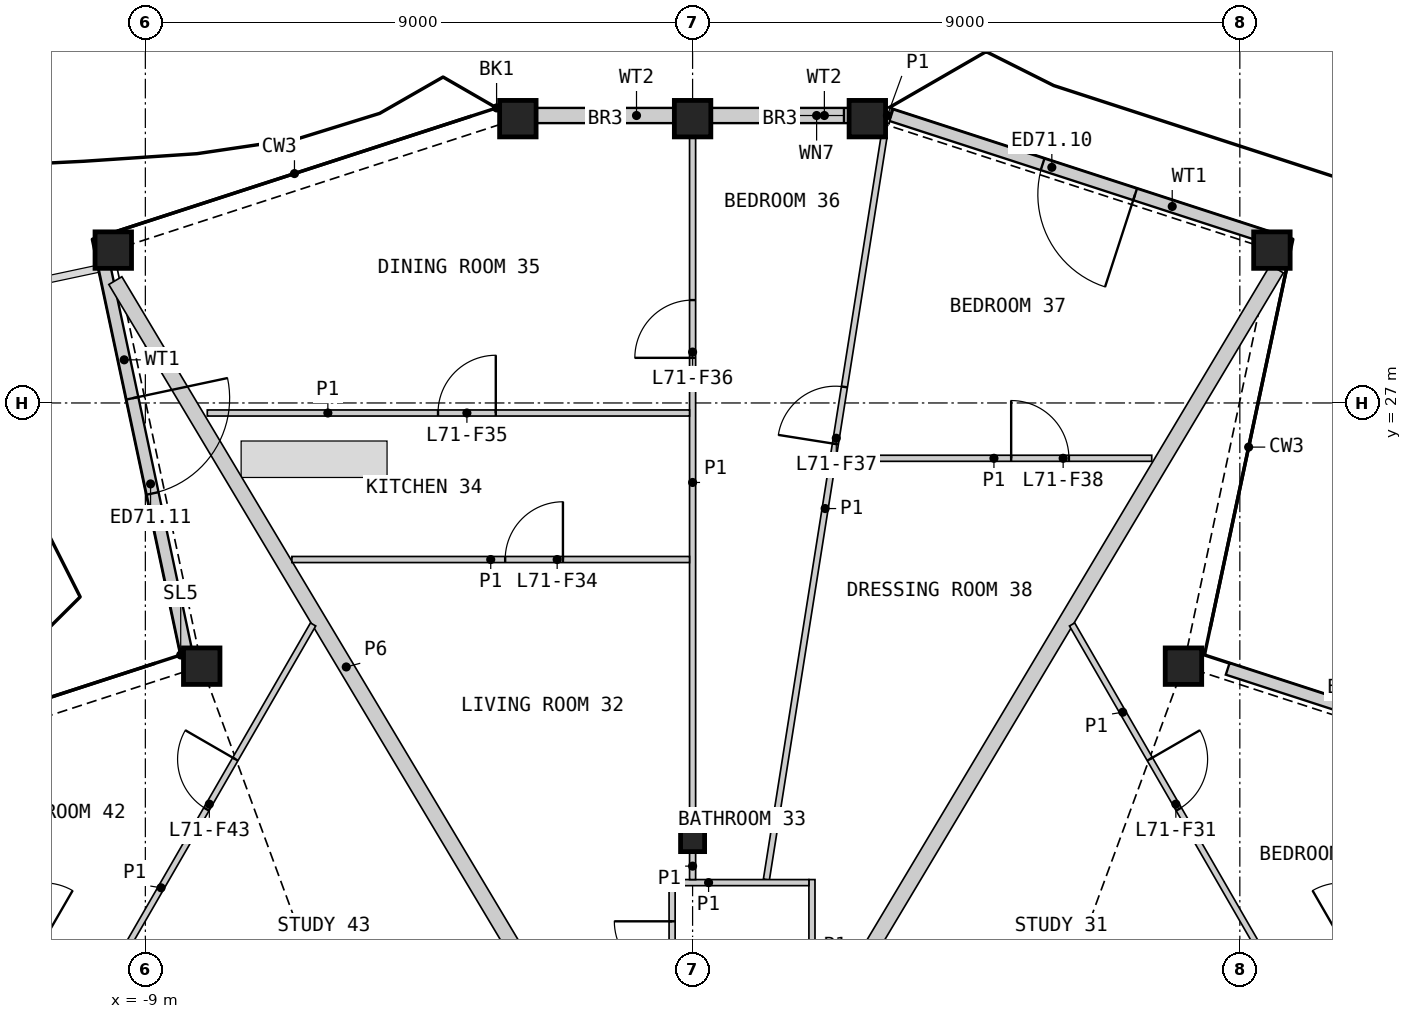
"""IFC4 building model, lengths in metres.
Left out: names, types, materials, properties, quantities, classifications, styles, units other than length and angle.
Written with IfcOpenShell. Run it as: python <this file> out.ifc"""

import sys

from ifc_helpers import new_model, si_unit, direction, frame, frame_2d, origin, origin_2d, place, context, subcontext, project, spatial, rectangle, hollow_rectangle, i_section, extrude, element, fill, save


model = new_model("IFC4")
c1 = context("Model", 3, precision=1e-05, world=origin(), true_north=direction((0.0, 1.0)))
c2 = subcontext(c1, "Body", "Model", "MODEL_VIEW")
j1 = project(units=[si_unit("LENGTHUNIT", "METRE"), si_unit("PLANEANGLEUNIT", "RADIAN")], contexts=[c1])
p1 = place(None, origin())
s1 = spatial("IfcSite", under=j1, at=p1, CompositionType="ELEMENT")
p2 = place(p1, origin())
s2 = spatial("IfcBuilding", under=s1, at=p2, CompositionType="ELEMENT")
p3 = place(p2, frame((0.0, 0.0, 322.2)))
s3 = spatial("IfcBuildingStorey", under=s2, at=p3, CompositionType="ELEMENT", Elevation=322.2)
for number, where, z_axis, x_axis in (
    (1, (8.073, 22.671, 0.0), (0.0, 0.0, 1.0), (1.0, 0.0, 0.0)),
    (2, (9.527, 29.514, 0.0), (0.0, 0.0, 1.0), (1.0, 0.0, 0.0)),
    (3, (2.874, 31.676, 0.0), (0.0, 0.0, 1.0), (1.0, 0.0, 0.0)),
    (4, (0.0, 31.676, 0.0), (0.0, 0.0, 1.0), (1.0, 0.0, 0.0)),
    (5, (-2.874, 31.676, 0.0), (0.0, 0.0, 1.0), (1.0, 0.0, 0.0)),
    (6, (-9.527, 29.514, 0.0), (0.0, 0.0, 1.0), (1.0, 0.0, 0.0)),
    (7, (-8.073, 22.671, 0.0), (0.0, 0.0, 1.0), (1.0, 0.0, 0.0)),
):
    element("IfcColumn", number, at=place(p3, frame(where, z_axis=z_axis, x_axis=x_axis)), inside=s3, PredefinedType="COLUMN", context=c2, shape_type="SweptSolid", body=[
        extrude(hollow_rectangle(XDim=0.6, YDim=0.6, WallThickness=0.04, at=origin_2d()), origin(), (0.0, 0.0, 1.0), 3.4),
    ])
p4 = place(p3, frame((0.0, 19.811, 0.0), z_axis=(0.0, 0.0, 1.0), x_axis=(1.0, 0.0, 0.0)))
e8 = element("IfcColumn", 8, at=p4, inside=s3, PredefinedType="COLUMN", context=c2, shape_type="SweptSolid", body=[
    extrude(i_section(OverallWidth=0.396, OverallDepth=0.381, WebThickness=0.019, FlangeThickness=0.03, at=origin_2d()), origin(), (0.0, 0.0, 1.0), 3.4),
])
p5 = place(p3, frame((14.623, 20.734, 0.0), z_axis=(0.0, 0.0, 1.0), x_axis=(-0.951056631566, 0.309016639608, 0.0)))
e9 = element("IfcWall", 9, at=p5, inside=s3, PredefinedType="SOLIDWALL", context=c2, shape_type="SweptSolid", body=[
    extrude(rectangle(XDim=6.122, YDim=0.2, at=frame_2d((3.061, 0.0))), origin(), (0.0, 0.0, 1.0), 2.488),
])
p6 = place(p5, frame((2.261, 0.0, 0.0)))
e10 = element("IfcOpeningElement", 10, at=p6, cuts=e9, PredefinedType="OPENING", context=c2, shape_type="SweptSolid", body=[
    extrude(rectangle(XDim=1.6, YDim=2.25, at=frame_2d((0.8, 1.125))), frame((0.0, 0.11, 0.0), z_axis=(0.0, -1.0, 0.0), x_axis=(1.0, 0.0, 0.0)), (0.0, 0.0, 1.0), 0.22),
])
p7 = place(p3, frame((9.428, 29.732, 0.0), z_axis=(0.0, 0.0, 1.0), x_axis=(-0.951057057516, 0.309015328664, 0.0)))
e11 = element("IfcWall", 11, at=p7, inside=s3, PredefinedType="SOLIDWALL", context=c2, shape_type="SweptSolid", body=[
    extrude(rectangle(XDim=6.477, YDim=0.2, at=frame_2d((3.238, 0.0))), origin(), (0.0, 0.0, 1.0), 2.488),
])
p8 = place(p7, frame((2.261, 0.0, 0.0)))
e12 = element("IfcOpeningElement", 12, at=p8, cuts=e11, PredefinedType="OPENING", context=c2, shape_type="SweptSolid", body=[
    extrude(rectangle(XDim=1.6, YDim=2.25, at=frame_2d((0.8, 1.125))), frame((0.0, 0.11, 0.0), z_axis=(0.0, -1.0, 0.0), x_axis=(1.0, 0.0, 0.0)), (0.0, 0.0, 1.0), 0.22),
])
p9 = place(p3, frame((2.79, 31.728, 0.0), z_axis=(0.0, 0.0, 1.0), x_axis=(-1.0, 0.0, 0.0)))
e13 = element("IfcWall", 13, at=p9, inside=s3, PredefinedType="SOLIDWALL", context=c2, shape_type="SweptSolid", body=[
    extrude(rectangle(XDim=2.49, YDim=0.25, at=frame_2d((1.245, 0.0))), origin(), (0.0, 0.0, 1.0), 2.488),
])
p10 = place(p9, frame((0.3, 0.0, 0.4)))
e14 = element("IfcOpeningElement", 14, at=p10, cuts=e13, PredefinedType="OPENING", context=c2, shape_type="SweptSolid", body=[
    extrude(rectangle(XDim=0.9, YDim=0.6, at=frame_2d((0.45, 0.3))), frame((0.0, 0.135, 0.0), z_axis=(0.0, -1.0, 0.0), x_axis=(1.0, 0.0, 0.0)), (0.0, 0.0, 1.0), 0.27),
])
p11 = place(p3, frame((-0.3, 31.728, 0.0), z_axis=(0.0, 0.0, 1.0), x_axis=(-1.0, 0.0, 0.0)))
e15 = element("IfcWall", 15, at=p11, inside=s3, PredefinedType="SOLIDWALL", context=c2, shape_type="SweptSolid", body=[
    extrude(rectangle(XDim=2.49, YDim=0.25, at=frame_2d((1.245, 0.0))), origin(), (0.0, 0.0, 1.0), 2.488),
])
p12 = place(p3, frame((-9.684, 29.289, 0.0), z_axis=(0.0, 0.0, 1.0), x_axis=(0.207920686021, -0.978145688701, 0.0)))
e16 = element("IfcWall", 16, at=p12, inside=s3, PredefinedType="SOLIDWALL", context=c2, shape_type="SweptSolid", body=[
    extrude(rectangle(XDim=6.459, YDim=0.2, at=frame_2d((3.229, 0.0))), origin(), (0.0, 0.0, 1.0), 2.488),
])
p13 = place(p12, frame((2.261, 0.0, 0.0)))
e17 = element("IfcOpeningElement", 17, at=p13, cuts=e16, PredefinedType="OPENING", context=c2, shape_type="SweptSolid", body=[
    extrude(rectangle(XDim=1.6, YDim=2.25, at=frame_2d((0.8, 1.125))), frame((0.0, 0.11, 0.0), z_axis=(0.0, -1.0, 0.0), x_axis=(1.0, 0.0, 0.0)), (0.0, 0.0, 1.0), 0.22),
])
p14 = place(p3, frame((1.899, 16.304, 0.0), z_axis=(0.0, 0.0, 1.0), x_axis=(0.512977925681, 0.858401798556, 0.0)))
e18 = element("IfcWall", 18, at=p14, inside=s3, PredefinedType="PARTITIONING", context=c2, shape_type="SweptSolid", body=[
    extrude(rectangle(XDim=15.028, YDim=0.25, at=frame_2d((7.514, 0.0))), origin(), (0.0, 0.0, 1.0), 2.33),
])
p15 = place(p3, frame((-9.493, 29.012, 0.0), z_axis=(0.0, 0.0, 1.0), x_axis=(0.512967150926, -0.85840823742, 0.0)))
e19 = element("IfcWall", 19, at=p15, inside=s3, PredefinedType="PARTITIONING", context=c2, shape_type="SweptSolid", body=[
    extrude(rectangle(XDim=14.805, YDim=0.25, at=frame_2d((7.402, 0.0))), origin(), (0.0, 0.0, 1.0), 2.33),
])
p16 = place(p3, frame((-14.417, 20.32, 0.0), z_axis=(0.0, 0.0, 1.0), x_axis=(0.866021216079, -0.500007253249, 0.0)))
e20 = element("IfcWall", 20, at=p16, inside=s3, PredefinedType="PARTITIONING", context=c2, shape_type="SweptSolid", body=[
    extrude(rectangle(XDim=12.639, YDim=0.1, at=frame_2d((6.32, 0.0))), origin(), (0.0, 0.0, 1.0), 2.33),
])
p17 = place(p16, frame((3.375, 0.0, 0.0)))
e21 = element("IfcOpeningElement", 21, at=p17, cuts=e20, PredefinedType="OPENING", context=c2, shape_type="SweptSolid", body=[
    extrude(rectangle(XDim=0.95, YDim=2.1, at=frame_2d((0.475, 1.05))), frame((0.0, 0.06, 0.0), z_axis=(0.0, -1.0, 0.0), x_axis=(1.0, 0.0, 0.0)), (0.0, 0.0, 1.0), 0.12),
])
p18 = place(p3, frame((3.47, 14.0, 0.0), z_axis=(0.0, 0.0, 1.0), x_axis=(0.866021216079, 0.500007253249, 0.0)))
e22 = element("IfcWall", 22, at=p18, inside=s3, PredefinedType="PARTITIONING", context=c2, shape_type="SweptSolid", body=[
    extrude(rectangle(XDim=12.639, YDim=0.1, at=frame_2d((6.32, 0.0))), origin(), (0.0, 0.0, 1.0), 2.33),
])
p19 = place(p18, frame((8.314, 0.0, 0.0)))
e23 = element("IfcOpeningElement", 23, at=p19, cuts=e22, PredefinedType="OPENING", context=c2, shape_type="SweptSolid", body=[
    extrude(rectangle(XDim=0.95, YDim=2.1, at=frame_2d((0.475, 1.05))), frame((0.0, 0.06, 0.0), z_axis=(0.0, -1.0, 0.0), x_axis=(1.0, 0.0, 0.0)), (0.0, 0.0, 1.0), 0.12),
])
p20 = place(p3, frame((1.213, 19.16, 0.0), z_axis=(0.0, 0.0, 1.0), x_axis=(0.156426176129, 0.987689653394, 0.0)))
e24 = element("IfcWall", 24, at=p20, inside=s3, PredefinedType="PARTITIONING", context=c2, shape_type="SweptSolid", body=[
    extrude(rectangle(XDim=12.358, YDim=0.1, at=frame_2d((6.179, 0.0))), origin(), (0.0, 0.0, 1.0), 2.33),
])
p21 = place(p20, frame((7.255, 0.0, 0.0)))
e25 = element("IfcOpeningElement", 25, at=p21, cuts=e24, PredefinedType="OPENING", context=c2, shape_type="SweptSolid", body=[
    extrude(rectangle(XDim=0.95, YDim=2.1, at=frame_2d((0.475, 1.05))), frame((0.0, 0.06, 0.0), z_axis=(0.0, -1.0, 0.0), x_axis=(1.0, 0.0, 0.0)), (0.0, 0.0, 1.0), 0.12),
])
p22 = place(p3, frame((0.0, 20.019, 0.0), z_axis=(0.0, 0.0, 1.0), x_axis=(0.0, 1.0, 0.0)))
e26 = element("IfcWall", 26, at=p22, inside=s3, PredefinedType="PARTITIONING", context=c2, shape_type="SweptSolid", body=[
    extrude(rectangle(XDim=11.347, YDim=0.1, at=frame_2d((5.674, 0.0))), origin(), (0.0, 0.0, 1.0), 2.33),
])
p23 = place(p22, frame((7.723, 0.0, 0.0)))
e27 = element("IfcOpeningElement", 27, at=p23, cuts=e26, PredefinedType="OPENING", context=c2, shape_type="SweptSolid", body=[
    extrude(rectangle(XDim=0.95, YDim=2.1, at=frame_2d((0.475, 1.05))), frame((0.0, 0.06, 0.0), z_axis=(0.0, -1.0, 0.0), x_axis=(1.0, 0.0, 0.0)), (0.0, 0.0, 1.0), 0.12),
])
p24 = place(p3, frame((-7.981, 26.835, 0.0), z_axis=(0.0, 0.0, 1.0), x_axis=(1.0, 0.0, 0.0)))
e28 = element("IfcWall", 28, at=p24, inside=s3, PredefinedType="PARTITIONING", context=c2, shape_type="SweptSolid", body=[
    extrude(rectangle(XDim=7.931, YDim=0.1, at=frame_2d((3.966, 0.0))), origin(), (0.0, 0.0, 1.0), 2.33),
])
p25 = place(p24, frame((3.794, 0.0, 0.0)))
e29 = element("IfcOpeningElement", 29, at=p25, cuts=e28, PredefinedType="OPENING", context=c2, shape_type="SweptSolid", body=[
    extrude(rectangle(XDim=0.95, YDim=2.1, at=frame_2d((0.475, 1.05))), frame((0.0, 0.06, 0.0), z_axis=(0.0, -1.0, 0.0), x_axis=(1.0, 0.0, 0.0)), (0.0, 0.0, 1.0), 0.12),
])
p26 = place(p3, frame((6.241, 23.357, 0.0), z_axis=(0.0, 0.0, 1.0), x_axis=(0.499998189891, -0.866026448849, 0.0)))
e30 = element("IfcWall", 30, at=p26, inside=s3, PredefinedType="PARTITIONING", context=c2, shape_type="SweptSolid", body=[
    extrude(rectangle(XDim=6.668, YDim=0.1, at=frame_2d((3.334, 0.0))), origin(), (0.0, 0.0, 1.0), 2.33),
])
p27 = place(p26, frame((2.558, 0.0, 0.0)))
e31 = element("IfcOpeningElement", 31, at=p27, cuts=e30, PredefinedType="OPENING", context=c2, shape_type="SweptSolid", body=[
    extrude(rectangle(XDim=0.95, YDim=2.1, at=frame_2d((0.475, 1.05))), frame((0.0, 0.06, 0.0), z_axis=(0.0, -1.0, 0.0), x_axis=(1.0, 0.0, 0.0)), (0.0, 0.0, 1.0), 0.12),
])
p28 = place(p3, frame((-9.575, 17.583, 0.0), z_axis=(0.0, 0.0, 1.0), x_axis=(0.499998189891, 0.866026448849, 0.0)))
e32 = element("IfcWall", 32, at=p28, inside=s3, PredefinedType="PARTITIONING", context=c2, shape_type="SweptSolid", body=[
    extrude(rectangle(XDim=6.668, YDim=0.1, at=frame_2d((3.334, 0.0))), origin(), (0.0, 0.0, 1.0), 2.33),
])
p29 = place(p28, frame((3.16, 0.0, 0.0)))
e33 = element("IfcOpeningElement", 33, at=p29, cuts=e32, PredefinedType="OPENING", context=c2, shape_type="SweptSolid", body=[
    extrude(rectangle(XDim=0.95, YDim=2.1, at=frame_2d((0.475, 1.05))), frame((0.0, 0.06, 0.0), z_axis=(0.0, -1.0, 0.0), x_axis=(1.0, 0.0, 0.0)), (0.0, 0.0, 1.0), 0.12),
])
p30 = place(p3, frame((-6.59, 24.425, 0.0), z_axis=(0.0, 0.0, 1.0), x_axis=(1.0, 0.0, 0.0)))
e34 = element("IfcWall", 34, at=p30, inside=s3, PredefinedType="PARTITIONING", context=c2, shape_type="SweptSolid", body=[
    extrude(rectangle(XDim=6.54, YDim=0.1, at=frame_2d((3.27, 0.0))), origin(), (0.0, 0.0, 1.0), 2.33),
])
p31 = place(p30, frame((3.508, 0.0, 0.0)))
e35 = element("IfcOpeningElement", 35, at=p31, cuts=e34, PredefinedType="OPENING", context=c2, shape_type="SweptSolid", body=[
    extrude(rectangle(XDim=0.95, YDim=2.1, at=frame_2d((0.475, 1.05))), frame((0.0, 0.06, 0.0), z_axis=(0.0, -1.0, 0.0), x_axis=(1.0, 0.0, 0.0)), (0.0, 0.0, 1.0), 0.12),
])
p32 = place(p3, frame((2.361, 26.09, 0.0), z_axis=(0.0, 0.0, 1.0), x_axis=(1.0, 0.0, 0.0)))
e36 = element("IfcWall", 36, at=p32, inside=s3, PredefinedType="PARTITIONING", context=c2, shape_type="SweptSolid", body=[
    extrude(rectangle(XDim=5.19, YDim=0.1, at=frame_2d((2.595, 0.0))), origin(), (0.0, 0.0, 1.0), 2.33),
])
p33 = place(p32, frame((2.878, 0.0, 0.0)))
e37 = element("IfcOpeningElement", 37, at=p33, cuts=e36, PredefinedType="OPENING", context=c2, shape_type="SweptSolid", body=[
    extrude(rectangle(XDim=0.95, YDim=2.1, at=frame_2d((0.475, 1.05))), frame((0.0, 0.06, 0.0), z_axis=(0.0, -1.0, 0.0), x_axis=(1.0, 0.0, 0.0)), (0.0, 0.0, 1.0), 0.12),
])
p34 = place(p3, frame((-0.337, 16.511, 0.0), z_axis=(0.0, 0.0, 1.0), x_axis=(0.0, 1.0, 0.0)))
e38 = element("IfcWall", 38, at=p34, inside=s3, PredefinedType="PARTITIONING", context=c2, shape_type="SweptSolid", body=[
    extrude(rectangle(XDim=2.65, YDim=0.1, at=frame_2d((1.325, 0.0))), origin(), (0.0, 0.0, 1.0), 2.33),
])
p35 = place(p34, frame((1.014, 0.0, 0.0)))
e39 = element("IfcOpeningElement", 39, at=p35, cuts=e38, PredefinedType="OPENING", context=c2, shape_type="SweptSolid", body=[
    extrude(rectangle(XDim=0.95, YDim=2.1, at=frame_2d((0.475, 1.05))), frame((0.0, 0.06, 0.0), z_axis=(0.0, -1.0, 0.0), x_axis=(1.0, 0.0, 0.0)), (0.0, 0.0, 1.0), 0.12),
])
p36 = place(p3, frame((1.963, 16.536, 0.0), z_axis=(0.0, 0.0, 1.0), x_axis=(0.0, 1.0, 0.0)))
e40 = element("IfcWall", 40, at=p36, inside=s3, PredefinedType="PARTITIONING", context=c2, shape_type="SweptSolid", body=[
    extrude(rectangle(XDim=2.625, YDim=0.1, at=frame_2d((1.312, 0.0))), origin(), (0.0, 0.0, 1.0), 2.33),
])
p37 = place(p3, frame((-0.287, 19.111, 0.0), z_axis=(0.0, 0.0, 1.0), x_axis=(1.0, 0.0, 0.0)))
e41 = element("IfcWall", 41, at=p37, inside=s3, PredefinedType="PARTITIONING", context=c2, shape_type="SweptSolid", body=[
    extrude(rectangle(XDim=2.2, YDim=0.1, at=frame_2d((1.1, 0.0))), origin(), (0.0, 0.0, 1.0), 2.33),
])
p38 = place(p3, frame((0.0, 19.161, 0.0), z_axis=(0.0, 0.0, 1.0), x_axis=(0.0, 1.0, 0.0)))
e42 = element("IfcWall", 42, at=p38, inside=s3, PredefinedType="PARTITIONING", context=c2, shape_type="SweptSolid", body=[
    extrude(rectangle(XDim=0.442, YDim=0.1, at=frame_2d((0.221, 0.0))), origin(), (0.0, 0.0, 1.0), 2.33),
])
p39 = place(p3, frame((3.184, 31.601, 0.0), z_axis=(0.0, 0.0, 1.0), x_axis=(0.156307264128, 0.987708478844, 0.0)))
e43 = element("IfcWall", 43, at=p39, inside=s3, PredefinedType="PARTITIONING", context=c2, shape_type="SweptSolid", body=[
    extrude(rectangle(XDim=0.255, YDim=0.1, at=frame_2d((0.127, 0.0))), origin(), (0.0, 0.0, 1.0), 2.33),
])
p40 = place(p8, origin())
e44 = element("IfcDoor", 44, at=p40, inside=s3, OperationType="DOUBLE_DOOR_SINGLE_SWING", PredefinedType="DOOR", context=c2, shape_type="SweptSolid", body=[
    extrude(rectangle(XDim=1.6, YDim=2.25, at=frame_2d((0.8, 1.125))), frame((0.0, 0.025, 0.0), z_axis=(0.0, -1.0, 0.0), x_axis=(1.0, 0.0, 0.0)), (0.0, 0.0, 1.0), 0.05),
])
fill(e12, e44)
p41 = place(p10, origin())
e45 = element("IfcWindow", 45, at=p41, inside=s3, PartitioningType="SINGLE_PANEL", PredefinedType="WINDOW", context=c2, shape_type="SweptSolid", body=[
    extrude(rectangle(XDim=0.9, YDim=0.6, at=frame_2d((0.45, 0.3))), frame((0.0, 0.03, 0.0), z_axis=(0.0, -1.0, 0.0), x_axis=(1.0, 0.0, 0.0)), (0.0, 0.0, 1.0), 0.06),
])
fill(e14, e45)
p42 = place(p13, origin())
e46 = element("IfcDoor", 46, at=p42, inside=s3, OperationType="DOUBLE_DOOR_SINGLE_SWING", PredefinedType="DOOR", context=c2, shape_type="SweptSolid", body=[
    extrude(rectangle(XDim=1.6, YDim=2.25, at=frame_2d((0.8, 1.125))), frame((0.0, 0.025, 0.0), z_axis=(0.0, -1.0, 0.0), x_axis=(1.0, 0.0, 0.0)), (0.0, 0.0, 1.0), 0.05),
])
fill(e17, e46)
p43 = place(p27, origin())
e47 = element("IfcDoor", 47, at=p43, inside=s3, OperationType="SINGLE_SWING_LEFT", PredefinedType="DOOR", context=c2, shape_type="SweptSolid", body=[
    extrude(rectangle(XDim=0.95, YDim=2.1, at=frame_2d((0.475, 1.05))), frame((0.0, 0.025, 0.0), z_axis=(0.0, -1.0, 0.0), x_axis=(1.0, 0.0, 0.0)), (0.0, 0.0, 1.0), 0.05),
])
fill(e31, e47)
p44 = place(p35, origin())
e48 = element("IfcDoor", 48, at=p44, inside=s3, OperationType="SINGLE_SWING_RIGHT", PredefinedType="DOOR", context=c2, shape_type="SweptSolid", body=[
    extrude(rectangle(XDim=0.95, YDim=2.1, at=frame_2d((0.475, 1.05))), frame((0.0, 0.025, 0.0), z_axis=(0.0, -1.0, 0.0), x_axis=(1.0, 0.0, 0.0)), (0.0, 0.0, 1.0), 0.05),
])
fill(e39, e48)
p45 = place(p31, origin())
e49 = element("IfcDoor", 49, at=p45, inside=s3, OperationType="SINGLE_SWING_RIGHT", PredefinedType="DOOR", context=c2, shape_type="SweptSolid", body=[
    extrude(rectangle(XDim=0.95, YDim=2.1, at=frame_2d((0.475, 1.05))), frame((0.0, 0.025, 0.0), z_axis=(0.0, -1.0, 0.0), x_axis=(1.0, 0.0, 0.0)), (0.0, 0.0, 1.0), 0.05),
])
fill(e35, e49)
p46 = place(p25, origin())
e50 = element("IfcDoor", 50, at=p46, inside=s3, OperationType="SINGLE_SWING_RIGHT", PredefinedType="DOOR", context=c2, shape_type="SweptSolid", body=[
    extrude(rectangle(XDim=0.95, YDim=2.1, at=frame_2d((0.475, 1.05))), frame((0.0, 0.025, 0.0), z_axis=(0.0, -1.0, 0.0), x_axis=(1.0, 0.0, 0.0)), (0.0, 0.0, 1.0), 0.05),
])
fill(e29, e50)
p47 = place(p23, origin())
e51 = element("IfcDoor", 51, at=p47, inside=s3, OperationType="SINGLE_SWING_LEFT", PredefinedType="DOOR", context=c2, shape_type="SweptSolid", body=[
    extrude(rectangle(XDim=0.95, YDim=2.1, at=frame_2d((0.475, 1.05))), frame((0.0, 0.025, 0.0), z_axis=(0.0, -1.0, 0.0), x_axis=(1.0, 0.0, 0.0)), (0.0, 0.0, 1.0), 0.05),
])
fill(e27, e51)
p48 = place(p21, origin())
e52 = element("IfcDoor", 52, at=p48, inside=s3, OperationType="SINGLE_SWING_LEFT", PredefinedType="DOOR", context=c2, shape_type="SweptSolid", body=[
    extrude(rectangle(XDim=0.95, YDim=2.1, at=frame_2d((0.475, 1.05))), frame((0.0, 0.025, 0.0), z_axis=(0.0, -1.0, 0.0), x_axis=(1.0, 0.0, 0.0)), (0.0, 0.0, 1.0), 0.05),
])
fill(e25, e52)
p49 = place(p33, origin())
e53 = element("IfcDoor", 53, at=p49, inside=s3, OperationType="SINGLE_SWING_LEFT", PredefinedType="DOOR", context=c2, shape_type="SweptSolid", body=[
    extrude(rectangle(XDim=0.95, YDim=2.1, at=frame_2d((0.475, 1.05))), frame((0.0, 0.025, 0.0), z_axis=(0.0, -1.0, 0.0), x_axis=(1.0, 0.0, 0.0)), (0.0, 0.0, 1.0), 0.05),
])
fill(e37, e53)
p50 = place(p29, origin())
e54 = element("IfcDoor", 54, at=p50, inside=s3, OperationType="SINGLE_SWING_RIGHT", PredefinedType="DOOR", context=c2, shape_type="SweptSolid", body=[
    extrude(rectangle(XDim=0.95, YDim=2.1, at=frame_2d((0.475, 1.05))), frame((0.0, 0.025, 0.0), z_axis=(0.0, -1.0, 0.0), x_axis=(1.0, 0.0, 0.0)), (0.0, 0.0, 1.0), 0.05),
])
fill(e33, e54)
save(model, sys.argv[1])
